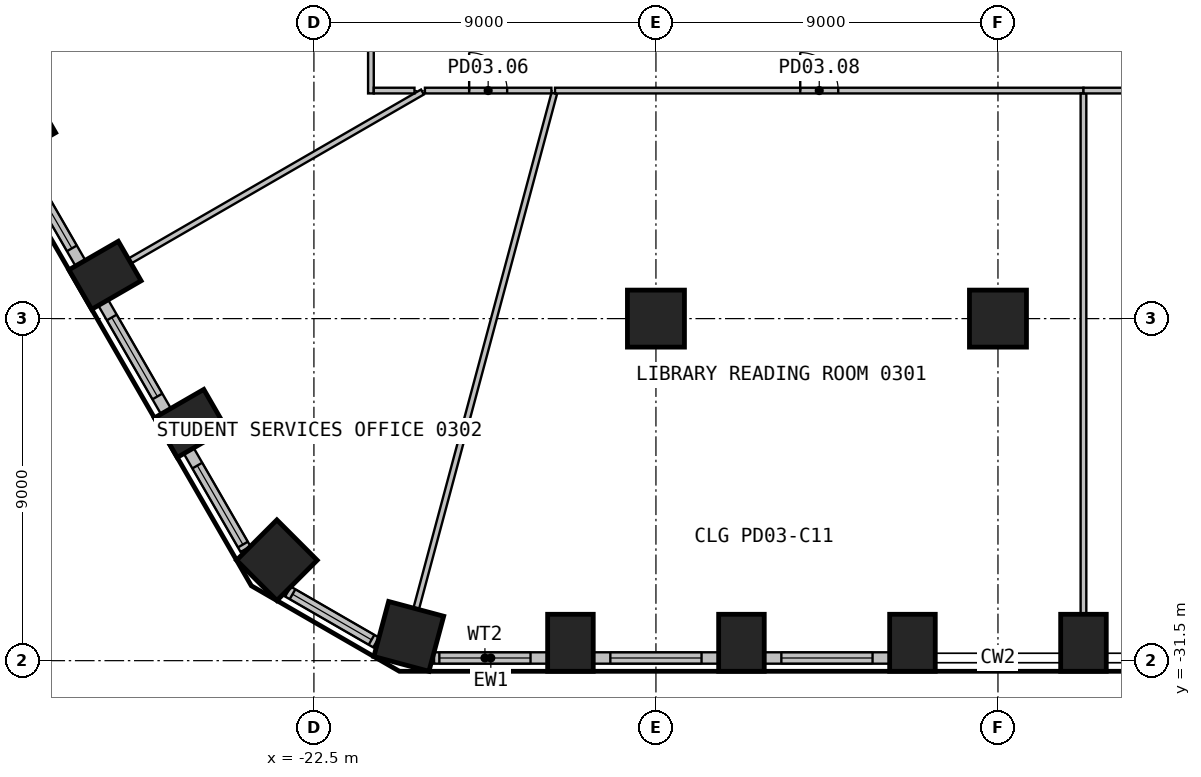
"""IFC4 building model, lengths in metres.
Left out: names, types, materials, properties, quantities, classifications, styles, units other than length and angle.
Written with IfcOpenShell. Run it as: python <this file> out.ifc"""

import sys

from ifc_helpers import new_model, si_unit, direction, frame, frame_2d, origin, origin_2d, place, context, subcontext, project, spatial, rectangle, circle, extrude, element, fill, save


model = new_model("IFC4")
c1 = context("Model", 3, precision=1e-05, world=origin(), true_north=direction((0.0, 1.0)))
c2 = subcontext(c1, "Body", "Model", "MODEL_VIEW")
j1 = project(units=[si_unit("LENGTHUNIT", "METRE"), si_unit("PLANEANGLEUNIT", "RADIAN")], contexts=[c1])
p1 = place(None, origin())
s1 = spatial("IfcSite", under=j1, at=p1, CompositionType="ELEMENT")
p2 = place(p1, origin())
s2 = spatial("IfcBuilding", under=s1, at=p2, CompositionType="ELEMENT")
p3 = place(p2, frame((0.0, 0.0, 15.6)))
s3 = spatial("IfcBuildingStorey", under=s2, at=p3, CompositionType="ELEMENT", Elevation=15.6)
p4 = place(p3, frame((-20.004, -30.861, 0.0), z_axis=(0.0, 0.0, 1.0), x_axis=(0.965925826289, -0.258819045103, 0.0)))
e1 = element("IfcColumn", 1, at=p4, inside=s3, PredefinedType="COLUMN", context=c2, shape_type="SweptSolid", body=[
    extrude(rectangle(XDim=1.5, YDim=1.5, at=origin_2d()), origin(), (0.0, 0.0, 1.0), 4.4),
])
for number, where, z_axis, x_axis in (
    (2, (-15.75, -31.03, 0.0), (0.0, 0.0, 1.0), (1.0, 0.0, 0.0)),
    (3, (-11.25, -31.03, 0.0), (0.0, 0.0, 1.0), (1.0, 0.0, 0.0)),
    (4, (-6.75, -31.03, 0.0), (0.0, 0.0, 1.0), (1.0, 0.0, 0.0)),
    (5, (-2.25, -31.03, 0.0), (0.0, 0.0, 1.0), (1.0, 0.0, 0.0)),
    (6, (-30.248, -17.463, 0.0), (0.0, 0.0, 1.0), (0.5, -0.866, 0.0)),
    (7, (-27.998, -21.361, 0.0), (0.0, 0.0, 1.0), (0.5, -0.866, 0.0)),
    (8, (-25.748, -25.258, 0.0), (0.0, 0.0, 1.0), (0.5, -0.866, 0.0)),
):
    element("IfcColumn", number, at=place(p3, frame(where, z_axis=z_axis, x_axis=x_axis)), inside=s3, PredefinedType="COLUMN", context=c2, shape_type="SweptSolid", body=[
        extrude(rectangle(XDim=1.2, YDim=1.5, at=origin_2d()), origin(), (0.0, 0.0, 1.0), 4.4),
    ])
p5 = place(p3, frame((-23.475, -28.857, 0.0), z_axis=(0.0, 0.0, 1.0), x_axis=(0.707106781187, -0.707106781187, 0.0)))
e9 = element("IfcColumn", 9, at=p5, inside=s3, PredefinedType="COLUMN", context=c2, shape_type="SweptSolid", body=[
    extrude(rectangle(XDim=1.5, YDim=1.5, at=origin_2d()), origin(), (0.0, 0.0, 1.0), 4.4),
])
for number, where, z_axis, x_axis in (
    (10, (-13.5, -22.5, 0.0), (0.0, 0.0, 1.0), (1.0, 0.0, 0.0)),
    (11, (-4.5, -22.5, 0.0), (0.0, 0.0, 1.0), (1.0, 0.0, 0.0)),
):
    element("IfcColumn", number, at=place(p3, frame(where, z_axis=z_axis, x_axis=x_axis)), inside=s3, PredefinedType="COLUMN", context=c2, shape_type="SweptSolid", body=[
        extrude(circle(Radius=0.75, at=origin_2d()), origin(), (0.0, 0.0, 1.0), 4.4),
    ])
p6 = place(p3, frame((-19.339, -31.43, 0.0), z_axis=(0.0, 0.0, 1.0), x_axis=(1.0, 0.0, 0.0)))
e12 = element("IfcWall", 12, at=p6, inside=s3, PredefinedType="SOLIDWALL", context=c2, shape_type="SweptSolid", body=[
    extrude(rectangle(XDim=2.989, YDim=0.3, at=frame_2d((1.494, 0.0))), origin(), (0.0, 0.0, 1.0), 4.4),
])
p7 = place(p6, frame((0.139, 0.0, 0.9)))
e13 = element("IfcOpeningElement", 13, at=p7, cuts=e12, PredefinedType="OPENING", context=c2, shape_type="SweptSolid", body=[
    extrude(rectangle(XDim=2.4, YDim=3.0, at=frame_2d((1.2, 1.5))), frame((0.0, 0.16, 0.0), z_axis=(0.0, -1.0, 0.0), x_axis=(1.0, 0.0, 0.0)), (0.0, 0.0, 1.0), 0.32),
])
p8 = place(p3, frame((-15.149, -31.43, 0.0), z_axis=(0.0, 0.0, 1.0), x_axis=(1.0, 0.0, 0.0)))
e14 = element("IfcWall", 14, at=p8, inside=s3, PredefinedType="SOLIDWALL", context=c2, shape_type="SweptSolid", body=[
    extrude(rectangle(XDim=3.299, YDim=0.3, at=frame_2d((1.649, 0.0))), origin(), (0.0, 0.0, 1.0), 4.4),
])
p9 = place(p8, frame((0.449, 0.0, 0.9)))
e15 = element("IfcOpeningElement", 15, at=p9, cuts=e14, PredefinedType="OPENING", context=c2, shape_type="SweptSolid", body=[
    extrude(rectangle(XDim=2.4, YDim=3.0, at=frame_2d((1.2, 1.5))), frame((0.0, 0.16, 0.0), z_axis=(0.0, -1.0, 0.0), x_axis=(1.0, 0.0, 0.0)), (0.0, 0.0, 1.0), 0.32),
])
p10 = place(p3, frame((-10.649, -31.43, 0.0), z_axis=(0.0, 0.0, 1.0), x_axis=(1.0, 0.0, 0.0)))
e16 = element("IfcWall", 16, at=p10, inside=s3, PredefinedType="SOLIDWALL", context=c2, shape_type="SweptSolid", body=[
    extrude(rectangle(XDim=3.299, YDim=0.3, at=frame_2d((1.649, 0.0))), origin(), (0.0, 0.0, 1.0), 4.4),
])
p11 = place(p10, frame((0.449, 0.0, 0.9)))
e17 = element("IfcOpeningElement", 17, at=p11, cuts=e16, PredefinedType="OPENING", context=c2, shape_type="SweptSolid", body=[
    extrude(rectangle(XDim=2.4, YDim=3.0, at=frame_2d((1.2, 1.5))), frame((0.0, 0.16, 0.0), z_axis=(0.0, -1.0, 0.0), x_axis=(1.0, 0.0, 0.0)), (0.0, 0.0, 1.0), 0.32),
])
p12 = place(p3, frame((-30.294, -18.184, 0.0), z_axis=(0.0, 0.0, 1.0), x_axis=(0.499991515992, -0.866030301974, 0.0)))
e18 = element("IfcWall", 18, at=p12, inside=s3, PredefinedType="SOLIDWALL", context=c2, shape_type="SweptSolid", body=[
    extrude(rectangle(XDim=3.299, YDim=0.3, at=frame_2d((1.649, 0.0))), origin(), (0.0, 0.0, 1.0), 4.4),
])
p13 = place(p12, frame((0.449, 0.0, 0.9)))
e19 = element("IfcOpeningElement", 19, at=p13, cuts=e18, PredefinedType="OPENING", context=c2, shape_type="SweptSolid", body=[
    extrude(rectangle(XDim=2.4, YDim=3.0, at=frame_2d((1.2, 1.5))), frame((0.0, 0.16, 0.0), z_axis=(0.0, -1.0, 0.0), x_axis=(1.0, 0.0, 0.0)), (0.0, 0.0, 1.0), 0.32),
])
p14 = place(p3, frame((-28.044, -22.081, 0.0), z_axis=(0.0, 0.0, 1.0), x_axis=(0.499991515992, -0.866030301974, 0.0)))
e20 = element("IfcWall", 20, at=p14, inside=s3, PredefinedType="SOLIDWALL", context=c2, shape_type="SweptSolid", body=[
    extrude(rectangle(XDim=3.299, YDim=0.3, at=frame_2d((1.649, 0.0))), origin(), (0.0, 0.0, 1.0), 4.4),
])
p15 = place(p14, frame((0.449, 0.0, 0.9)))
e21 = element("IfcOpeningElement", 21, at=p15, cuts=e20, PredefinedType="OPENING", context=c2, shape_type="SweptSolid", body=[
    extrude(rectangle(XDim=2.4, YDim=3.0, at=frame_2d((1.2, 1.5))), frame((0.0, 0.16, 0.0), z_axis=(0.0, -1.0, 0.0), x_axis=(1.0, 0.0, 0.0)), (0.0, 0.0, 1.0), 0.32),
])
p16 = place(p3, frame((-25.794, -25.978, 0.0), z_axis=(0.0, 0.0, 1.0), x_axis=(0.49999586137, -0.866027793211, 0.0)))
e22 = element("IfcWall", 22, at=p16, inside=s3, PredefinedType="SOLIDWALL", context=c2, shape_type="SweptSolid", body=[
    extrude(rectangle(XDim=2.989, YDim=0.3, at=frame_2d((1.494, 0.0))), origin(), (0.0, 0.0, 1.0), 4.4),
])
p17 = place(p16, frame((0.449, 0.0, 0.9)))
e23 = element("IfcOpeningElement", 23, at=p17, cuts=e22, PredefinedType="OPENING", context=c2, shape_type="SweptSolid", body=[
    extrude(rectangle(XDim=2.4, YDim=3.0, at=frame_2d((1.2, 1.5))), frame((0.0, 0.16, 0.0), z_axis=(0.0, -1.0, 0.0), x_axis=(1.0, 0.0, 0.0)), (0.0, 0.0, 1.0), 0.32),
])
p18 = place(p3, frame((-23.183, -29.682, 0.0), z_axis=(0.0, 0.0, 1.0), x_axis=(0.866001915448, -0.500040680786, 0.0)))
e24 = element("IfcWall", 24, at=p18, inside=s3, PredefinedType="SOLIDWALL", context=c2, shape_type="SweptSolid", body=[
    extrude(rectangle(XDim=2.678, YDim=0.3, at=frame_2d((1.339, 0.0))), origin(), (0.0, 0.0, 1.0), 4.4),
])
p19 = place(p18, frame((0.139, 0.0, 0.9)))
e25 = element("IfcOpeningElement", 25, at=p19, cuts=e24, PredefinedType="OPENING", context=c2, shape_type="SweptSolid", body=[
    extrude(rectangle(XDim=2.4, YDim=3.0, at=frame_2d((1.2, 1.5))), frame((0.0, 0.16, 0.0), z_axis=(0.0, -1.0, 0.0), x_axis=(1.0, 0.0, 0.0)), (0.0, 0.0, 1.0), 0.32),
])
p20 = place(p3, frame((-19.644, -16.538, 0.0), z_axis=(0.0, 0.0, 1.0), x_axis=(-0.866000072607, -0.50004387232, 0.0)))
e26 = element("IfcWall", 26, at=p20, inside=s3, PredefinedType="PARTITIONING", context=c2, shape_type="SweptSolid", body=[
    extrude(rectangle(XDim=8.876, YDim=0.15, at=frame_2d((4.438, 0.0))), origin(), (0.0, 0.0, 1.0), 4.4),
])
p21 = place(p3, frame((-21.0, -2.325, 0.0), z_axis=(0.0, 0.0, 1.0), x_axis=(0.0, -1.0, 0.0)))
e27 = element("IfcWall", 27, at=p21, inside=s3, PredefinedType="PARTITIONING", context=c2, shape_type="SweptSolid", body=[
    extrude(rectangle(XDim=14.25, YDim=0.15, at=frame_2d((7.125, 0.0))), origin(), (0.0, 0.0, 1.0), 4.4),
])
p22 = place(p21, frame((6.625, 0.0, 0.0)))
e28 = element("IfcOpeningElement", 28, at=p22, cuts=e27, PredefinedType="OPENING", context=c2, shape_type="SweptSolid", body=[
    extrude(rectangle(XDim=1.0, YDim=2.1, at=frame_2d((0.5, 1.05))), frame((0.0, 0.085, 0.0), z_axis=(0.0, -1.0, 0.0), x_axis=(1.0, 0.0, 0.0)), (0.0, 0.0, 1.0), 0.17),
])
p23 = place(p3, frame((-20.925, -16.5, 0.0), z_axis=(0.0, 0.0, 1.0), x_axis=(1.0, 0.0, 0.0)))
e29 = element("IfcWall", 29, at=p23, inside=s3, PredefinedType="PARTITIONING", context=c2, shape_type="SweptSolid", body=[
    extrude(rectangle(XDim=1.071, YDim=0.15, at=frame_2d((0.536, 0.0))), origin(), (0.0, 0.0, 1.0), 4.4),
])
p24 = place(p3, frame((-16.175, -16.573, 0.0), z_axis=(0.0, 0.0, 1.0), x_axis=(-0.258838193525, -0.965920695281, 0.0)))
e30 = element("IfcWall", 30, at=p24, inside=s3, PredefinedType="PARTITIONING", context=c2, shape_type="SweptSolid", body=[
    extrude(rectangle(XDim=14.023, YDim=0.15, at=frame_2d((7.011, 0.0))), origin(), (0.0, 0.0, 1.0), 4.4),
])
p25 = place(p3, frame((-19.579, -16.5, 0.0), z_axis=(0.0, 0.0, 1.0), x_axis=(1.0, 0.0, 0.0)))
e31 = element("IfcWall", 31, at=p25, inside=s3, PredefinedType="PARTITIONING", context=c2, shape_type="SweptSolid", body=[
    extrude(rectangle(XDim=3.328, YDim=0.15, at=frame_2d((1.664, 0.0))), origin(), (0.0, 0.0, 1.0), 4.4),
])
p26 = place(p25, frame((1.164, 0.0, 0.0)))
e32 = element("IfcOpeningElement", 32, at=p26, cuts=e31, PredefinedType="OPENING", context=c2, shape_type="SweptSolid", body=[
    extrude(rectangle(XDim=1.0, YDim=2.1, at=frame_2d((0.5, 1.05))), frame((0.0, 0.085, 0.0), z_axis=(0.0, -1.0, 0.0), x_axis=(1.0, 0.0, 0.0)), (0.0, 0.0, 1.0), 0.17),
])
p27 = place(p3, frame((-16.156, -16.5, 0.0), z_axis=(0.0, 0.0, 1.0), x_axis=(1.0, 0.0, 0.0)))
e33 = element("IfcWall", 33, at=p27, inside=s3, PredefinedType="PARTITIONING", context=c2, shape_type="SweptSolid", body=[
    extrude(rectangle(XDim=13.906, YDim=0.15, at=frame_2d((6.953, 0.0))), origin(), (0.0, 0.0, 1.0), 4.4),
])
p28 = place(p27, frame((6.453, 0.0, 0.0)))
e34 = element("IfcOpeningElement", 34, at=p28, cuts=e33, PredefinedType="OPENING", context=c2, shape_type="SweptSolid", body=[
    extrude(rectangle(XDim=1.0, YDim=2.1, at=frame_2d((0.5, 1.05))), frame((0.0, 0.085, 0.0), z_axis=(0.0, -1.0, 0.0), x_axis=(1.0, 0.0, 0.0)), (0.0, 0.0, 1.0), 0.17),
])
p29 = place(p3, frame((-2.25, -16.575, 0.0), z_axis=(0.0, 0.0, 1.0), x_axis=(0.0, -1.0, 0.0)))
e35 = element("IfcWall", 35, at=p29, inside=s3, PredefinedType="PARTITIONING", context=c2, shape_type="SweptSolid", body=[
    extrude(rectangle(XDim=13.685, YDim=0.15, at=frame_2d((6.842, 0.0))), origin(), (0.0, 0.0, 1.0), 4.4),
])
p30 = place(p3, frame((-2.25, -16.5, 0.0), z_axis=(0.0, 0.0, 1.0), x_axis=(1.0, 0.0, 0.0)))
e36 = element("IfcWall", 36, at=p30, inside=s3, PredefinedType="PARTITIONING", context=c2, shape_type="SweptSolid", body=[
    extrude(rectangle(XDim=18.0, YDim=0.15, at=frame_2d((9.0, 0.0))), origin(), (0.0, 0.0, 1.0), 4.4),
])
p31 = place(p30, frame((8.5, 0.0, 0.0)))
e37 = element("IfcOpeningElement", 37, at=p31, cuts=e36, PredefinedType="OPENING", context=c2, shape_type="SweptSolid", body=[
    extrude(rectangle(XDim=1.0, YDim=2.1, at=frame_2d((0.5, 1.05))), frame((0.0, 0.085, 0.0), z_axis=(0.0, -1.0, 0.0), x_axis=(1.0, 0.0, 0.0)), (0.0, 0.0, 1.0), 0.17),
])
p32 = place(p7, origin())
e38 = element("IfcWindow", 38, at=p32, inside=s3, PartitioningType="SINGLE_PANEL", PredefinedType="WINDOW", context=c2, shape_type="SweptSolid", body=[
    extrude(rectangle(XDim=2.4, YDim=3.0, at=frame_2d((1.2, 1.5))), frame((0.0, 0.03, 0.0), z_axis=(0.0, -1.0, 0.0), x_axis=(1.0, 0.0, 0.0)), (0.0, 0.0, 1.0), 0.06),
])
fill(e13, e38)
p33 = place(p9, origin())
e39 = element("IfcWindow", 39, at=p33, inside=s3, PartitioningType="SINGLE_PANEL", PredefinedType="WINDOW", context=c2, shape_type="SweptSolid", body=[
    extrude(rectangle(XDim=2.4, YDim=3.0, at=frame_2d((1.2, 1.5))), frame((0.0, 0.03, 0.0), z_axis=(0.0, -1.0, 0.0), x_axis=(1.0, 0.0, 0.0)), (0.0, 0.0, 1.0), 0.06),
])
fill(e15, e39)
p34 = place(p11, origin())
e40 = element("IfcWindow", 40, at=p34, inside=s3, PartitioningType="SINGLE_PANEL", PredefinedType="WINDOW", context=c2, shape_type="SweptSolid", body=[
    extrude(rectangle(XDim=2.4, YDim=3.0, at=frame_2d((1.2, 1.5))), frame((0.0, 0.03, 0.0), z_axis=(0.0, -1.0, 0.0), x_axis=(1.0, 0.0, 0.0)), (0.0, 0.0, 1.0), 0.06),
])
fill(e17, e40)
p35 = place(p13, origin())
e41 = element("IfcWindow", 41, at=p35, inside=s3, PartitioningType="SINGLE_PANEL", PredefinedType="WINDOW", context=c2, shape_type="SweptSolid", body=[
    extrude(rectangle(XDim=2.4, YDim=3.0, at=frame_2d((1.2, 1.5))), frame((0.0, 0.03, 0.0), z_axis=(0.0, -1.0, 0.0), x_axis=(1.0, 0.0, 0.0)), (0.0, 0.0, 1.0), 0.06),
])
fill(e19, e41)
p36 = place(p15, origin())
e42 = element("IfcWindow", 42, at=p36, inside=s3, PartitioningType="SINGLE_PANEL", PredefinedType="WINDOW", context=c2, shape_type="SweptSolid", body=[
    extrude(rectangle(XDim=2.4, YDim=3.0, at=frame_2d((1.2, 1.5))), frame((0.0, 0.03, 0.0), z_axis=(0.0, -1.0, 0.0), x_axis=(1.0, 0.0, 0.0)), (0.0, 0.0, 1.0), 0.06),
])
fill(e21, e42)
p37 = place(p17, origin())
e43 = element("IfcWindow", 43, at=p37, inside=s3, PartitioningType="SINGLE_PANEL", PredefinedType="WINDOW", context=c2, shape_type="SweptSolid", body=[
    extrude(rectangle(XDim=2.4, YDim=3.0, at=frame_2d((1.2, 1.5))), frame((0.0, 0.03, 0.0), z_axis=(0.0, -1.0, 0.0), x_axis=(1.0, 0.0, 0.0)), (0.0, 0.0, 1.0), 0.06),
])
fill(e23, e43)
p38 = place(p19, origin())
e44 = element("IfcWindow", 44, at=p38, inside=s3, PartitioningType="SINGLE_PANEL", PredefinedType="WINDOW", context=c2, shape_type="SweptSolid", body=[
    extrude(rectangle(XDim=2.4, YDim=3.0, at=frame_2d((1.2, 1.5))), frame((0.0, 0.03, 0.0), z_axis=(0.0, -1.0, 0.0), x_axis=(1.0, 0.0, 0.0)), (0.0, 0.0, 1.0), 0.06),
])
fill(e25, e44)
p39 = place(p26, origin())
e45 = element("IfcDoor", 45, at=p39, inside=s3, OperationType="SINGLE_SWING_RIGHT", PredefinedType="DOOR", context=c2, shape_type="SweptSolid", body=[
    extrude(rectangle(XDim=1.0, YDim=2.1, at=frame_2d((0.5, 1.05))), frame((0.0, 0.025, 0.0), z_axis=(0.0, -1.0, 0.0), x_axis=(1.0, 0.0, 0.0)), (0.0, 0.0, 1.0), 0.05),
])
fill(e32, e45)
p40 = place(p28, origin())
e46 = element("IfcDoor", 46, at=p40, inside=s3, OperationType="SINGLE_SWING_RIGHT", PredefinedType="DOOR", context=c2, shape_type="SweptSolid", body=[
    extrude(rectangle(XDim=1.0, YDim=2.1, at=frame_2d((0.5, 1.05))), frame((0.0, 0.025, 0.0), z_axis=(0.0, -1.0, 0.0), x_axis=(1.0, 0.0, 0.0)), (0.0, 0.0, 1.0), 0.05),
])
fill(e34, e46)
save(model, sys.argv[1])
